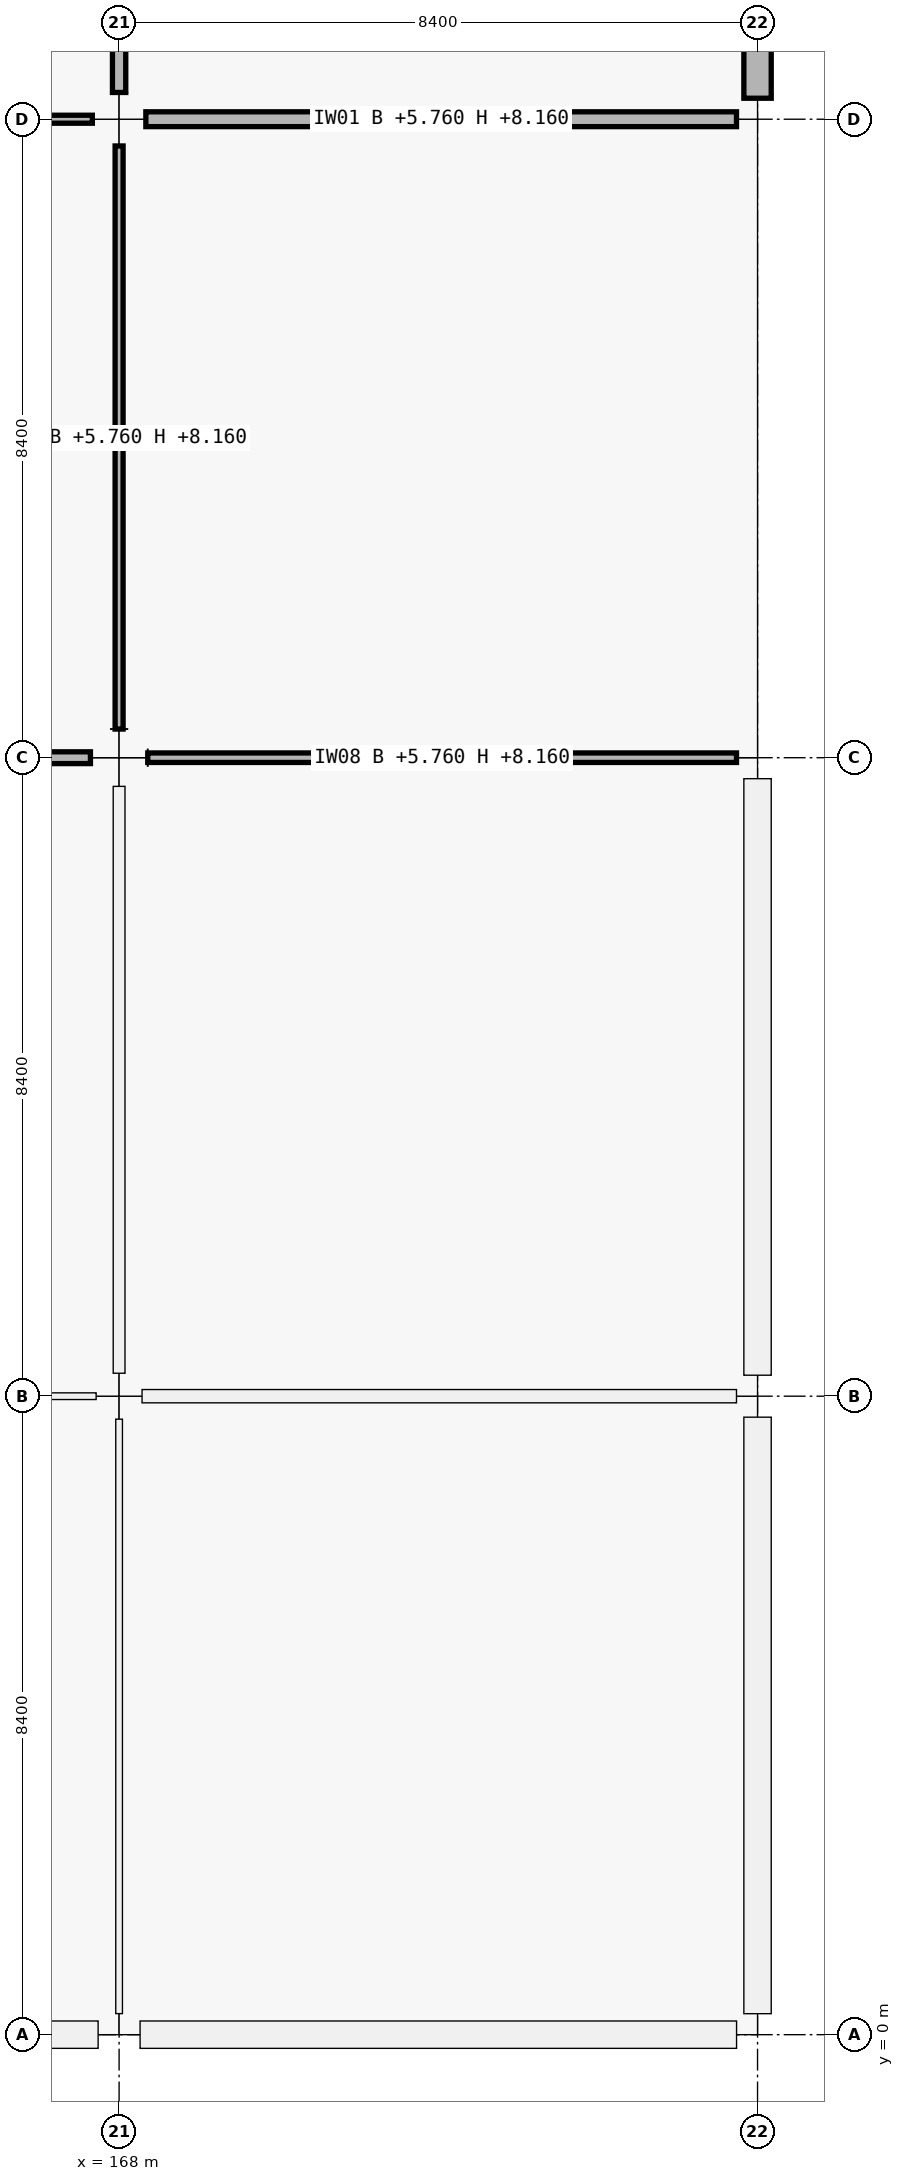
"""IFC4 building model, lengths in metres.
Left out: names, types, materials, properties, quantities, classifications, styles, units other than length and angle.
Written with IfcOpenShell. Run it as: python <this file> out.ifc"""

import sys

from ifc_helpers import new_model, si_unit, direction, frame, frame_2d, origin, origin_2d, place, context, subcontext, project, spatial, rectangle, extrude, element, fill, save


model = new_model("IFC4")
c1 = context("Model", 3, precision=1e-05, world=origin(), true_north=direction((0.0, 1.0)))
c2 = subcontext(c1, "Body", "Model", "MODEL_VIEW")
j1 = project(units=[si_unit("LENGTHUNIT", "METRE"), si_unit("PLANEANGLEUNIT", "RADIAN")], contexts=[c1])
p1 = place(None, origin())
s1 = spatial("IfcSite", under=j1, at=p1, CompositionType="ELEMENT")
p2 = place(p1, origin())
s2 = spatial("IfcBuilding", under=s1, at=p2, CompositionType="ELEMENT")
p3 = place(p2, frame((0.0, 0.0, 5.76)))
s3 = spatial("IfcBuildingStorey", under=s2, at=p3, CompositionType="ELEMENT", Elevation=5.76)
p4 = place(p3, frame((168.0, 0.0, 0.0), z_axis=(0.0, 0.0, 1.0), x_axis=(1.0, 0.0, 0.0)))
e1 = element("IfcColumn", 1, at=p4, inside=s3, PredefinedType="COLUMN", context=c2, shape_type="SweptSolid", body=[
    extrude(rectangle(XDim=0.55, YDim=0.55, at=origin_2d()), origin(), (0.0, 0.0, 1.0), 4.2),
])
p5 = place(p3, frame((168.0, 8.4, 0.0), z_axis=(0.0, 0.0, 1.0), x_axis=(1.0, 0.0, 0.0)))
e2 = element("IfcColumn", 2, at=p5, inside=s3, PredefinedType="COLUMN", context=c2, shape_type="SweptSolid", body=[
    extrude(rectangle(XDim=0.6, YDim=0.6, at=origin_2d()), origin(), (0.0, 0.0, 1.0), 4.5),
])
p6 = place(p3, frame((168.0, 16.8, 0.0), z_axis=(0.0, 0.0, 1.0), x_axis=(1.0, 0.0, 0.0)))
e3 = element("IfcColumn", 3, at=p6, inside=s3, PredefinedType="COLUMN", context=c2, shape_type="SweptSolid", body=[
    extrude(rectangle(XDim=0.75, YDim=0.75, at=origin_2d()), origin(), (0.0, 0.0, 1.0), 4.5),
])
p7 = place(p3, frame((168.0, 25.2, 0.0), z_axis=(0.0, 0.0, 1.0), x_axis=(1.0, 0.0, 0.0)))
e4 = element("IfcColumn", 4, at=p7, inside=s3, PredefinedType="COLUMN", context=c2, shape_type="SweptSolid", body=[
    extrude(rectangle(XDim=0.7, YDim=0.7, at=origin_2d()), origin(), (0.0, 0.0, 1.0), 4.5),
])
for number, where, z_axis, x_axis in (
    (5, (176.4, 0.0, 0.0), (0.0, 0.0, 1.0), (1.0, 0.0, 0.0)),
    (6, (176.4, 8.4, 0.0), (0.0, 0.0, 1.0), (1.0, 0.0, 0.0)),
    (7, (176.4, 16.8, 0.0), (0.0, 0.0, 1.0), (1.0, 0.0, 0.0)),
    (8, (176.4, 25.2, 0.0), (0.0, 0.0, 1.0), (1.0, 0.0, 0.0)),
):
    element("IfcColumn", number, at=place(p3, frame(where, z_axis=z_axis, x_axis=x_axis)), inside=s3, PredefinedType="COLUMN", context=c2, shape_type="SweptSolid", body=[
        extrude(rectangle(XDim=0.55, YDim=0.55, at=origin_2d()), origin(), (0.0, 0.0, 1.0), 4.2),
    ])
p8 = place(p3, frame((167.724, 0.0, 0.0), z_axis=(0.0, 0.0, 1.0), x_axis=(-1.0, 0.0, 0.0)))
e9 = element("IfcWall", 9, at=p8, inside=s3, PredefinedType="SOLIDWALL", context=c2, shape_type="SweptSolid", body=[
    extrude(rectangle(XDim=7.848, YDim=0.36, at=frame_2d((3.924, 0.0))), origin(), (0.0, 0.0, 1.0), 3.4),
])
p9 = place(p8, frame((3.199, 0.0, 0.9)))
e10 = element("IfcOpeningElement", 10, at=p9, cuts=e9, PredefinedType="OPENING", context=c2, shape_type="SweptSolid", body=[
    extrude(rectangle(XDim=1.45, YDim=1.85, at=frame_2d((0.725, 0.925))), frame((0.0, 0.18, 0.0), z_axis=(0.0, -1.0, 0.0), x_axis=(1.0, 0.0, 0.0)), (0.0, 0.0, 1.0), 0.36),
])
p10 = place(p3, frame((176.124, 0.0, 0.0), z_axis=(0.0, 0.0, 1.0), x_axis=(-1.0, 0.0, 0.0)))
e11 = element("IfcWall", 11, at=p10, inside=s3, PredefinedType="SOLIDWALL", context=c2, shape_type="SweptSolid", body=[
    extrude(rectangle(XDim=7.848, YDim=0.36, at=frame_2d((3.924, 0.0))), origin(), (0.0, 0.0, 1.0), 3.4),
])
p11 = place(p10, frame((3.049, 0.0, 0.9)))
e12 = element("IfcOpeningElement", 12, at=p11, cuts=e11, PredefinedType="OPENING", context=c2, shape_type="SweptSolid", body=[
    extrude(rectangle(XDim=1.75, YDim=1.95, at=frame_2d((0.875, 0.975))), frame((0.0, 0.18, 0.0), z_axis=(0.0, -1.0, 0.0), x_axis=(1.0, 0.0, 0.0)), (0.0, 0.0, 1.0), 0.36),
])
p12 = place(p3, frame((176.4, 8.124, 0.0), z_axis=(0.0, 0.0, 1.0), x_axis=(0.0, -1.0, 0.0)))
e13 = element("IfcWall", 13, at=p12, inside=s3, PredefinedType="SOLIDWALL", context=c2, shape_type="SweptSolid", body=[
    extrude(rectangle(XDim=7.848, YDim=0.36, at=frame_2d((3.924, 0.0))), origin(), (0.0, 0.0, 1.0), 3.4),
])
p13 = place(p12, frame((2.849, 0.0, 0.9)))
e14 = element("IfcOpeningElement", 14, at=p13, cuts=e13, PredefinedType="OPENING", context=c2, shape_type="SweptSolid", body=[
    extrude(rectangle(XDim=2.15, YDim=1.95, at=frame_2d((1.075, 0.975))), frame((0.0, 0.18, 0.0), z_axis=(0.0, -1.0, 0.0), x_axis=(1.0, 0.0, 0.0)), (0.0, 0.0, 1.0), 0.36),
])
p14 = place(p3, frame((176.4, 16.524, 0.0), z_axis=(0.0, 0.0, 1.0), x_axis=(0.0, -1.0, 0.0)))
e15 = element("IfcWall", 15, at=p14, inside=s3, PredefinedType="SOLIDWALL", context=c2, shape_type="SweptSolid", body=[
    extrude(rectangle(XDim=7.848, YDim=0.36, at=frame_2d((3.924, 0.0))), origin(), (0.0, 0.0, 1.0), 3.4),
])
p15 = place(p14, frame((2.649, 0.0, 0.9)))
e16 = element("IfcOpeningElement", 16, at=p15, cuts=e15, PredefinedType="OPENING", context=c2, shape_type="SweptSolid", body=[
    extrude(rectangle(XDim=2.55, YDim=1.95, at=frame_2d((1.275, 0.975))), frame((0.0, 0.18, 0.0), z_axis=(0.0, -1.0, 0.0), x_axis=(1.0, 0.0, 0.0)), (0.0, 0.0, 1.0), 0.36),
])
p16 = place(p3, frame((176.4, 33.324, 0.0), z_axis=(0.0, 0.0, 1.0), x_axis=(0.0, -1.0, 0.0)))
e17 = element("IfcWall", 17, at=p16, inside=s3, PredefinedType="SOLIDWALL", context=c2, shape_type="SweptSolid", body=[
    extrude(rectangle(XDim=7.848, YDim=0.36, at=frame_2d((3.924, 0.0))), origin(), (0.0, 0.0, 1.0), 3.4),
])
p17 = place(p16, frame((3.274, 0.0, 0.9)))
e18 = element("IfcOpeningElement", 18, at=p17, cuts=e17, PredefinedType="OPENING", context=c2, shape_type="SweptSolid", body=[
    extrude(rectangle(XDim=1.3, YDim=1.95, at=frame_2d((0.65, 0.975))), frame((0.0, 0.18, 0.0), z_axis=(0.0, -1.0, 0.0), x_axis=(1.0, 0.0, 0.0)), (0.0, 0.0, 1.0), 0.36),
])
p18 = place(p3, frame((159.927, 8.4, 0.0), z_axis=(0.0, 0.0, 1.0), x_axis=(1.0, 0.0, 0.0)))
e19 = element("IfcWall", 19, at=p18, inside=s3, PredefinedType="PARTITIONING", context=c2, shape_type="SweptSolid", body=[
    extrude(rectangle(XDim=7.771, YDim=0.088, at=frame_2d((3.885, 0.0))), origin(), (0.0, 0.0, 1.0), 2.4),
])
p19 = place(p18, frame((3.381, 0.0, 0.0)))
e20 = element("IfcOpeningElement", 20, at=p19, cuts=e19, PredefinedType="OPENING", context=c2, shape_type="SweptSolid", body=[
    extrude(rectangle(XDim=1.01, YDim=2.12, at=frame_2d((0.505, 1.06))), frame((0.0, 0.044, 0.0), z_axis=(0.0, -1.0, 0.0), x_axis=(1.0, 0.0, 0.0)), (0.0, 0.0, 1.0), 0.088),
])
p20 = place(p3, frame((159.952, 16.8, 0.0), z_axis=(0.0, 0.0, 1.0), x_axis=(1.0, 0.0, 0.0)))
e21 = element("IfcWall", 21, at=p20, inside=s3, PredefinedType="PARTITIONING", context=c2, shape_type="SweptSolid", body=[
    extrude(rectangle(XDim=7.671, YDim=0.155, at=frame_2d((3.835, 0.0))), origin(), (0.0, 0.0, 1.0), 2.4),
])
p21 = place(p20, frame((3.325, 0.0, 0.0)))
e22 = element("IfcOpeningElement", 22, at=p21, cuts=e21, PredefinedType="OPENING", context=c2, shape_type="SweptSolid", body=[
    extrude(rectangle(XDim=1.02, YDim=2.2, at=frame_2d((0.51, 1.1))), frame((0.0, 0.078, 0.0), z_axis=(0.0, -1.0, 0.0), x_axis=(1.0, 0.0, 0.0)), (0.0, 0.0, 1.0), 0.155),
])
p22 = place(p3, frame((159.977, 25.2, 0.0), z_axis=(0.0, 0.0, 1.0), x_axis=(1.0, 0.0, 0.0)))
e23 = element("IfcWall", 23, at=p22, inside=s3, PredefinedType="PARTITIONING", context=c2, shape_type="SweptSolid", body=[
    extrude(rectangle(XDim=7.671, YDim=0.105, at=frame_2d((3.835, 0.0))), origin(), (0.0, 0.0, 1.0), 2.4),
])
p23 = place(p22, frame((3.331, 0.0, 0.0)))
e24 = element("IfcOpeningElement", 24, at=p23, cuts=e23, PredefinedType="OPENING", context=c2, shape_type="SweptSolid", body=[
    extrude(rectangle(XDim=1.01, YDim=2.12, at=frame_2d((0.505, 1.06))), frame((0.0, 0.052, 0.0), z_axis=(0.0, -1.0, 0.0), x_axis=(1.0, 0.0, 0.0)), (0.0, 0.0, 1.0), 0.105),
])
p24 = place(p3, frame((168.302, 8.4, 0.0), z_axis=(0.0, 0.0, 1.0), x_axis=(1.0, 0.0, 0.0)))
e25 = element("IfcWall", 25, at=p24, inside=s3, PredefinedType="PARTITIONING", context=c2, shape_type="SweptSolid", body=[
    extrude(rectangle(XDim=7.821, YDim=0.175, at=frame_2d((3.911, 0.0))), origin(), (0.0, 0.0, 1.0), 2.4),
])
p25 = place(p24, frame((3.37, 0.0, 0.0)))
e26 = element("IfcOpeningElement", 26, at=p25, cuts=e25, PredefinedType="OPENING", context=c2, shape_type="SweptSolid", body=[
    extrude(rectangle(XDim=1.08, YDim=2.22, at=frame_2d((0.54, 1.11))), frame((0.0, 0.087, 0.0), z_axis=(0.0, -1.0, 0.0), x_axis=(1.0, 0.0, 0.0)), (0.0, 0.0, 1.0), 0.175),
])
p26 = place(p3, frame((168.377, 16.8, 0.0), z_axis=(0.0, 0.0, 1.0), x_axis=(1.0, 0.0, 0.0)))
e27 = element("IfcWall", 27, at=p26, inside=s3, PredefinedType="PARTITIONING", context=c2, shape_type="SweptSolid", body=[
    extrude(rectangle(XDim=7.746, YDim=0.125, at=frame_2d((3.873, 0.0))), origin(), (0.0, 0.0, 1.0), 2.4),
])
p27 = place(p26, frame((3.343, 0.0, 0.0)))
e28 = element("IfcOpeningElement", 28, at=p27, cuts=e27, PredefinedType="OPENING", context=c2, shape_type="SweptSolid", body=[
    extrude(rectangle(XDim=1.06, YDim=2.22, at=frame_2d((0.53, 1.11))), frame((0.0, 0.062, 0.0), z_axis=(0.0, -1.0, 0.0), x_axis=(1.0, 0.0, 0.0)), (0.0, 0.0, 1.0), 0.125),
])
p28 = place(p3, frame((168.352, 25.2, 0.0), z_axis=(0.0, 0.0, 1.0), x_axis=(1.0, 0.0, 0.0)))
e29 = element("IfcWall", 29, at=p28, inside=s3, PredefinedType="PARTITIONING", context=c2, shape_type="SweptSolid", body=[
    extrude(rectangle(XDim=7.771, YDim=0.195, at=frame_2d((3.885, 0.0))), origin(), (0.0, 0.0, 1.0), 2.4),
])
p29 = place(p28, frame((3.385, 0.0, 0.0)))
e30 = element("IfcOpeningElement", 30, at=p29, cuts=e29, PredefinedType="OPENING", context=c2, shape_type="SweptSolid", body=[
    extrude(rectangle(XDim=1.0, YDim=2.2, at=frame_2d((0.5, 1.1))), frame((0.0, 0.098, 0.0), z_axis=(0.0, -1.0, 0.0), x_axis=(1.0, 0.0, 0.0)), (0.0, 0.0, 1.0), 0.195),
])
p30 = place(p3, frame((168.0, 0.277, 0.0), z_axis=(0.0, 0.0, 1.0), x_axis=(0.0, 1.0, 0.0)))
e31 = element("IfcWall", 31, at=p30, inside=s3, PredefinedType="PARTITIONING", context=c2, shape_type="SweptSolid", body=[
    extrude(rectangle(XDim=7.821, YDim=0.088, at=frame_2d((3.91, 0.0))), origin(), (0.0, 0.0, 1.0), 2.4),
])
p31 = place(p30, frame((3.41, 0.0, 0.0)))
e32 = element("IfcOpeningElement", 32, at=p31, cuts=e31, PredefinedType="OPENING", context=c2, shape_type="SweptSolid", body=[
    extrude(rectangle(XDim=1.0, YDim=2.2, at=frame_2d((0.5, 1.1))), frame((0.0, 0.044, 0.0), z_axis=(0.0, -1.0, 0.0), x_axis=(1.0, 0.0, 0.0)), (0.0, 0.0, 1.0), 0.088),
])
p32 = place(p3, frame((168.0, 8.702, 0.0), z_axis=(0.0, 0.0, 1.0), x_axis=(0.0, 1.0, 0.0)))
e33 = element("IfcWall", 33, at=p32, inside=s3, PredefinedType="PARTITIONING", context=c2, shape_type="SweptSolid", body=[
    extrude(rectangle(XDim=7.721, YDim=0.155, at=frame_2d((3.861, 0.0))), origin(), (0.0, 0.0, 1.0), 2.4),
])
p33 = place(p32, frame((3.37, 0.0, 0.0)))
e34 = element("IfcOpeningElement", 34, at=p33, cuts=e33, PredefinedType="OPENING", context=c2, shape_type="SweptSolid", body=[
    extrude(rectangle(XDim=0.98, YDim=2.18, at=frame_2d((0.49, 1.09))), frame((0.0, 0.078, 0.0), z_axis=(0.0, -1.0, 0.0), x_axis=(1.0, 0.0, 0.0)), (0.0, 0.0, 1.0), 0.155),
])
p34 = place(p3, frame((168.0, 17.177, 0.0), z_axis=(0.0, 0.0, 1.0), x_axis=(0.0, 1.0, 0.0)))
e35 = element("IfcWall", 35, at=p34, inside=s3, PredefinedType="PARTITIONING", context=c2, shape_type="SweptSolid", body=[
    extrude(rectangle(XDim=7.671, YDim=0.105, at=frame_2d((3.835, 0.0))), origin(), (0.0, 0.0, 1.0), 2.4),
])
p35 = place(p34, frame((3.356, 0.0, 0.0)))
e36 = element("IfcOpeningElement", 36, at=p35, cuts=e35, PredefinedType="OPENING", context=c2, shape_type="SweptSolid", body=[
    extrude(rectangle(XDim=0.96, YDim=2.18, at=frame_2d((0.48, 1.09))), frame((0.0, 0.052, 0.0), z_axis=(0.0, -1.0, 0.0), x_axis=(1.0, 0.0, 0.0)), (0.0, 0.0, 1.0), 0.105),
])
p36 = place(p3, frame((168.0, 25.552, 0.0), z_axis=(0.0, 0.0, 1.0), x_axis=(0.0, 1.0, 0.0)))
e37 = element("IfcWall", 37, at=p36, inside=s3, PredefinedType="PARTITIONING", context=c2, shape_type="SweptSolid", body=[
    extrude(rectangle(XDim=7.671, YDim=0.175, at=frame_2d((3.835, 0.0))), origin(), (0.0, 0.0, 1.0), 2.4),
])
p37 = place(p36, frame((3.351, 0.0, 0.0)))
e38 = element("IfcOpeningElement", 38, at=p37, cuts=e37, PredefinedType="OPENING", context=c2, shape_type="SweptSolid", body=[
    extrude(rectangle(XDim=0.97, YDim=2.12, at=frame_2d((0.485, 1.06))), frame((0.0, 0.087, 0.0), z_axis=(0.0, -1.0, 0.0), x_axis=(1.0, 0.0, 0.0)), (0.0, 0.0, 1.0), 0.175),
])
p38 = place(p11, origin())
e39 = element("IfcWindow", 39, at=p38, inside=s3, PartitioningType="SINGLE_PANEL", PredefinedType="WINDOW", context=c2, shape_type="SweptSolid", body=[
    extrude(rectangle(XDim=1.75, YDim=1.95, at=frame_2d((0.875, 0.975))), frame((0.0, 0.03, 0.0), z_axis=(0.0, -1.0, 0.0), x_axis=(1.0, 0.0, 0.0)), (0.0, 0.0, 1.0), 0.06),
])
fill(e12, e39)
p39 = place(p13, origin())
e40 = element("IfcWindow", 40, at=p39, inside=s3, PartitioningType="SINGLE_PANEL", PredefinedType="WINDOW", context=c2, shape_type="SweptSolid", body=[
    extrude(rectangle(XDim=2.15, YDim=1.95, at=frame_2d((1.075, 0.975))), frame((0.0, 0.03, 0.0), z_axis=(0.0, -1.0, 0.0), x_axis=(1.0, 0.0, 0.0)), (0.0, 0.0, 1.0), 0.06),
])
fill(e14, e40)
p40 = place(p15, origin())
e41 = element("IfcWindow", 41, at=p40, inside=s3, PartitioningType="SINGLE_PANEL", PredefinedType="WINDOW", context=c2, shape_type="SweptSolid", body=[
    extrude(rectangle(XDim=2.55, YDim=1.95, at=frame_2d((1.275, 0.975))), frame((0.0, 0.03, 0.0), z_axis=(0.0, -1.0, 0.0), x_axis=(1.0, 0.0, 0.0)), (0.0, 0.0, 1.0), 0.06),
])
fill(e16, e41)
p41 = place(p25, origin())
e42 = element("IfcDoor", 42, at=p41, inside=s3, OperationType="SINGLE_SWING_LEFT", PredefinedType="DOOR", context=c2, shape_type="SweptSolid", body=[
    extrude(rectangle(XDim=1.08, YDim=2.22, at=frame_2d((0.54, 1.11))), frame((0.0, 0.025, 0.0), z_axis=(0.0, -1.0, 0.0), x_axis=(1.0, 0.0, 0.0)), (0.0, 0.0, 1.0), 0.05),
])
fill(e26, e42)
p42 = place(p27, origin())
e43 = element("IfcDoor", 43, at=p42, inside=s3, OperationType="SINGLE_SWING_RIGHT", PredefinedType="DOOR", context=c2, shape_type="SweptSolid", body=[
    extrude(rectangle(XDim=1.06, YDim=2.22, at=frame_2d((0.53, 1.11))), frame((0.0, 0.025, 0.0), z_axis=(0.0, -1.0, 0.0), x_axis=(1.0, 0.0, 0.0)), (0.0, 0.0, 1.0), 0.05),
])
fill(e28, e43)
p43 = place(p29, origin())
e44 = element("IfcDoor", 44, at=p43, inside=s3, OperationType="SINGLE_SWING_RIGHT", PredefinedType="DOOR", context=c2, shape_type="SweptSolid", body=[
    extrude(rectangle(XDim=1.0, YDim=2.2, at=frame_2d((0.5, 1.1))), frame((0.0, 0.025, 0.0), z_axis=(0.0, -1.0, 0.0), x_axis=(1.0, 0.0, 0.0)), (0.0, 0.0, 1.0), 0.05),
])
fill(e30, e44)
p44 = place(p31, origin())
e45 = element("IfcDoor", 45, at=p44, inside=s3, OperationType="SINGLE_SWING_LEFT", PredefinedType="DOOR", context=c2, shape_type="SweptSolid", body=[
    extrude(rectangle(XDim=1.0, YDim=2.2, at=frame_2d((0.5, 1.1))), frame((0.0, 0.025, 0.0), z_axis=(0.0, -1.0, 0.0), x_axis=(1.0, 0.0, 0.0)), (0.0, 0.0, 1.0), 0.05),
])
fill(e32, e45)
p45 = place(p33, origin())
e46 = element("IfcDoor", 46, at=p45, inside=s3, OperationType="SINGLE_SWING_RIGHT", PredefinedType="DOOR", context=c2, shape_type="SweptSolid", body=[
    extrude(rectangle(XDim=0.98, YDim=2.18, at=frame_2d((0.49, 1.09))), frame((0.0, 0.025, 0.0), z_axis=(0.0, -1.0, 0.0), x_axis=(1.0, 0.0, 0.0)), (0.0, 0.0, 1.0), 0.05),
])
fill(e34, e46)
p46 = place(p35, origin())
e47 = element("IfcDoor", 47, at=p46, inside=s3, OperationType="SINGLE_SWING_LEFT", PredefinedType="DOOR", context=c2, shape_type="SweptSolid", body=[
    extrude(rectangle(XDim=0.96, YDim=2.18, at=frame_2d((0.48, 1.09))), frame((0.0, 0.025, 0.0), z_axis=(0.0, -1.0, 0.0), x_axis=(1.0, 0.0, 0.0)), (0.0, 0.0, 1.0), 0.05),
])
fill(e36, e47)
save(model, sys.argv[1])
